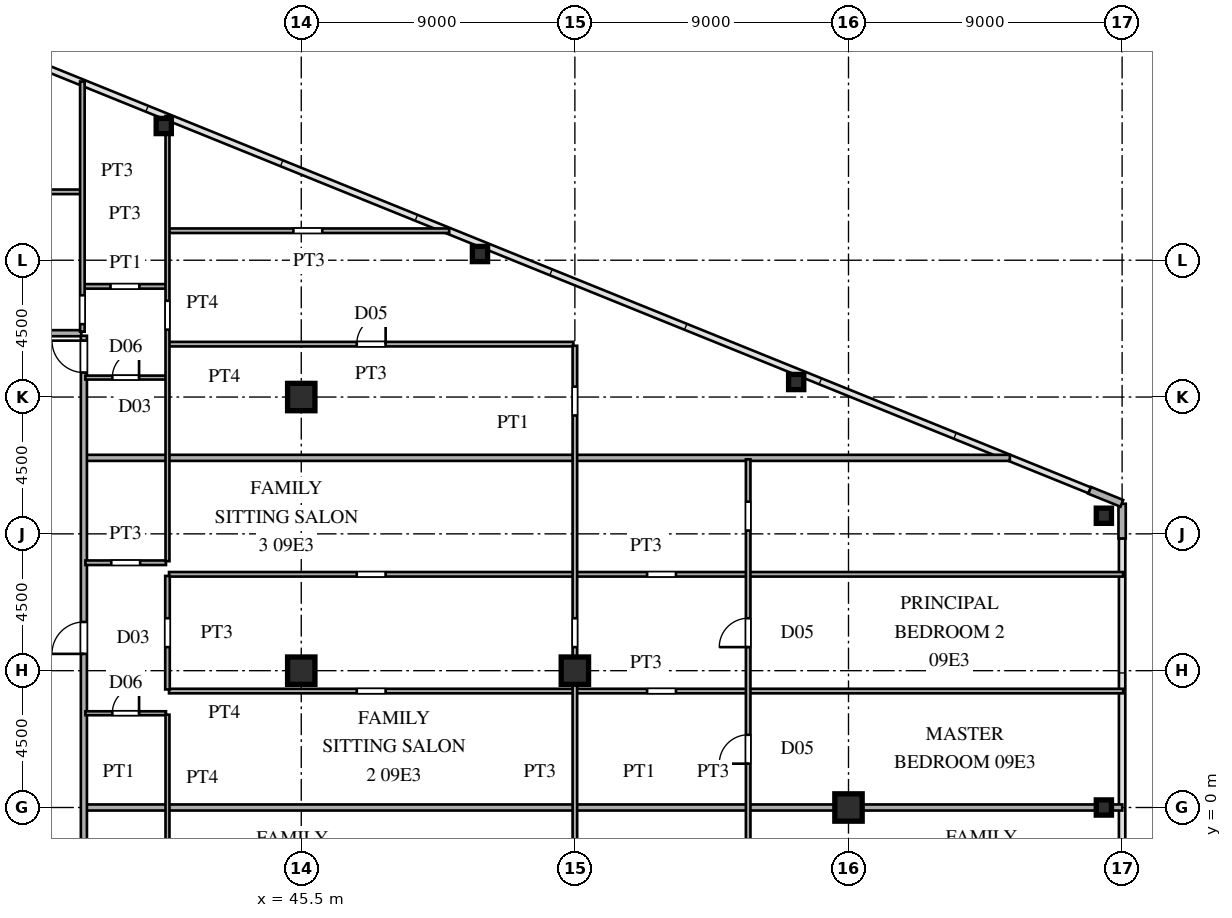
"""IFC4 building model, lengths in metres.
Left out: names, types, materials, properties, quantities, classifications, styles, units other than length and angle.
Written with IfcOpenShell. Run it as: python <this file> out.ifc"""

import sys

from ifc_helpers import new_model, si_unit, direction, frame, frame_2d, origin, origin_2d, place, context, subcontext, project, spatial, rectangle, hollow_rectangle, i_section, extrude, source, transform, mapped, element, fill, save


model = new_model("IFC4")
c1 = context("Model", 3, precision=1e-05, world=origin(), true_north=direction((0.0, 1.0)))
c2 = subcontext(c1, "Body", "Model", "MODEL_VIEW")
j1 = project(units=[si_unit("LENGTHUNIT", "METRE"), si_unit("PLANEANGLEUNIT", "RADIAN")], contexts=[c1])
p1 = place(None, origin())
s1 = spatial("IfcSite", under=j1, at=p1, CompositionType="ELEMENT")
p2 = place(p1, origin())
s2 = spatial("IfcBuilding", under=s1, at=p2, CompositionType="ELEMENT")
p3 = place(p2, frame((0.0, 0.0, 36.9)))
s3 = spatial("IfcBuildingStorey", under=s2, at=p3, CompositionType="ELEMENT", Elevation=36.9)
m1 = source(origin(), c2, "Body", "SweptSolid", [
    extrude(i_section(OverallWidth=0.9, OverallDepth=0.9, WebThickness=0.036, FlangeThickness=0.055, at=origin_2d()), origin(), (0.0, 0.0, 1.0), 3.6),
])
for number, where, z_axis, x_axis in (
    (1, (45.5, 4.5, 0.0), (0.0, 0.0, 1.0), (1.0, 0.0, 0.0)),
    (2, (45.5, 13.5, 0.0), (0.0, 0.0, 1.0), (1.0, 0.0, 0.0)),
    (3, (54.5, 4.5, 0.0), (0.0, 0.0, 1.0), (1.0, 0.0, 0.0)),
    (4, (63.5, 0.0, 0.0), (0.0, 0.0, 1.0), (1.0, 0.0, 0.0)),
):
    element("IfcColumn", number, at=place(p3, frame(where, z_axis=z_axis, x_axis=x_axis)), inside=s3, PredefinedType="COLUMN", context=c2, shape_type="MappedRepresentation", body=[
        mapped(m1, transform((0.0, 0.0, 0.0), scale=1.0)),
    ])
m2 = source(origin(), c2, "Body", "SweptSolid", [
    extrude(hollow_rectangle(XDim=0.5, YDim=0.5, WallThickness=0.02, at=origin_2d()), origin(), (0.0, 0.0, 1.0), 3.6),
])
for number, where, z_axis, x_axis in (
    (5, (71.9, 9.596, 0.0), (0.0, 0.0, 1.0), (1.0, 0.0, 0.0)),
    (6, (40.977, 22.414, 0.0), (0.0, 0.0, 1.0), (1.0, 0.0, 0.0)),
    (7, (51.378, 18.204, 0.0), (0.0, 0.0, 1.0), (1.0, 0.0, 0.0)),
    (8, (61.779, 13.994, 0.0), (0.0, 0.0, 1.0), (1.0, 0.0, 0.0)),
    (9, (71.9, 0.0, 0.0), (0.0, 0.0, 1.0), (1.0, 0.0, 0.0)),
):
    element("IfcColumn", number, at=place(p3, frame(where, z_axis=z_axis, x_axis=x_axis)), inside=s3, PredefinedType="COLUMN", context=c2, shape_type="MappedRepresentation", body=[
        mapped(m2, transform((0.0, 0.0, 0.0), scale=1.0)),
    ])
for number, where, z_axis, x_axis in (
    (10, (72.5, 8.85, 0.0), (0.0, 0.0, 1.0), (0.0, 1.0, 0.0)),
    (11, (72.491, 10.004, 0.0), (0.0, 0.0, 1.0), (-0.927, 0.375, 0.0)),
):
    element("IfcWall", number, at=place(p3, frame(where, z_axis=z_axis, x_axis=x_axis)), inside=s3, PredefinedType="SOLIDWALL", context=c2, shape_type="SweptSolid", body=[
        extrude(rectangle(XDim=1.14, YDim=0.24, at=frame_2d((0.57, 0.0))), origin(), (0.0, 0.0, 1.0), 3.38),
    ])
p4 = place(p3, frame((38.43, 0.0, 0.0), z_axis=(0.0, 0.0, 1.0), x_axis=(1.0, 0.0, 0.0)))
e12 = element("IfcWall", 12, at=p4, inside=s3, PredefinedType="PARTITIONING", context=c2, shape_type="SweptSolid", body=[
    extrude(rectangle(XDim=25.05, YDim=0.2, at=frame_2d((12.525, 0.0))), origin(), (0.0, 0.0, 1.0), 3.38),
])
p5 = place(p3, frame((63.48, 0.0, 0.0), z_axis=(0.0, 0.0, 1.0), x_axis=(1.0, 0.0, 0.0)))
e13 = element("IfcWall", 13, at=p5, inside=s3, PredefinedType="PARTITIONING", context=c2, shape_type="SweptSolid", body=[
    extrude(rectangle(XDim=9.025, YDim=0.2, at=frame_2d((4.512, 0.0))), origin(), (0.0, 0.0, 1.0), 2.68),
])
p6 = place(p3, frame((38.4, 3.1, 0.0), z_axis=(0.0, 0.0, 1.0), x_axis=(1.0, 0.0, 0.0)))
e14 = element("IfcWall", 14, at=p6, inside=s3, PredefinedType="PARTITIONING", context=c2, shape_type="SweptSolid", body=[
    extrude(rectangle(XDim=2.65, YDim=0.13, at=frame_2d((1.325, 0.0))), origin(), (0.0, 0.0, 1.0), 3.38),
])
p7 = place(p6, frame((0.885, 0.0, 0.0)))
e15 = element("IfcOpeningElement", 15, at=p7, cuts=e14, PredefinedType="OPENING", context=c2, shape_type="SweptSolid", body=[
    extrude(rectangle(XDim=0.88, YDim=2.1, at=frame_2d((0.44, 1.05))), frame((0.0, 0.075, 0.0), z_axis=(0.0, -1.0, 0.0), x_axis=(1.0, 0.0, 0.0)), (0.0, 0.0, 1.0), 0.15),
])
p8 = place(p3, frame((41.15, 3.83, 0.0), z_axis=(0.0, 0.0, 1.0), x_axis=(1.0, 0.0, 0.0)))
e16 = element("IfcWall", 16, at=p8, inside=s3, PredefinedType="PARTITIONING", context=c2, shape_type="SweptSolid", body=[
    extrude(rectangle(XDim=31.385, YDim=0.15, at=frame_2d((15.692, 0.0))), origin(), (0.0, 0.0, 1.0), 3.38),
])
p9 = place(p8, frame((6.175, 0.0, 0.0)))
e17 = element("IfcOpeningElement", 17, at=p9, cuts=e16, PredefinedType="OPENING", context=c2, shape_type="SweptSolid", body=[
    extrude(rectangle(XDim=0.95, YDim=2.15, at=frame_2d((0.475, 1.075))), frame((0.0, 0.085, 0.0), z_axis=(0.0, -1.0, 0.0), x_axis=(1.0, 0.0, 0.0)), (0.0, 0.0, 1.0), 0.17),
])
p10 = place(p8, frame((15.725, 0.0, 0.0)))
e18 = element("IfcOpeningElement", 18, at=p10, cuts=e16, PredefinedType="OPENING", context=c2, shape_type="SweptSolid", body=[
    extrude(rectangle(XDim=0.95, YDim=2.15, at=frame_2d((0.475, 1.075))), frame((0.0, 0.085, 0.0), z_axis=(0.0, -1.0, 0.0), x_axis=(1.0, 0.0, 0.0)), (0.0, 0.0, 1.0), 0.17),
])
p11 = place(p3, frame((41.15, 7.67, 0.0), z_axis=(0.0, 0.0, 1.0), x_axis=(1.0, 0.0, 0.0)))
e19 = element("IfcWall", 19, at=p11, inside=s3, PredefinedType="PARTITIONING", context=c2, shape_type="SweptSolid", body=[
    extrude(rectangle(XDim=31.385, YDim=0.15, at=frame_2d((15.692, 0.0))), origin(), (0.0, 0.0, 1.0), 3.38),
])
p12 = place(p11, frame((6.175, 0.0, 0.0)))
e20 = element("IfcOpeningElement", 20, at=p12, cuts=e19, PredefinedType="OPENING", context=c2, shape_type="SweptSolid", body=[
    extrude(rectangle(XDim=0.95, YDim=2.15, at=frame_2d((0.475, 1.075))), frame((0.0, 0.085, 0.0), z_axis=(0.0, -1.0, 0.0), x_axis=(1.0, 0.0, 0.0)), (0.0, 0.0, 1.0), 0.17),
])
p13 = place(p11, frame((15.725, 0.0, 0.0)))
e21 = element("IfcOpeningElement", 21, at=p13, cuts=e19, PredefinedType="OPENING", context=c2, shape_type="SweptSolid", body=[
    extrude(rectangle(XDim=0.95, YDim=2.15, at=frame_2d((0.475, 1.075))), frame((0.0, 0.085, 0.0), z_axis=(0.0, -1.0, 0.0), x_axis=(1.0, 0.0, 0.0)), (0.0, 0.0, 1.0), 0.17),
])
p14 = place(p3, frame((38.4, 8.05, 0.0), z_axis=(0.0, 0.0, 1.0), x_axis=(1.0, 0.0, 0.0)))
e22 = element("IfcWall", 22, at=p14, inside=s3, PredefinedType="PARTITIONING", context=c2, shape_type="SweptSolid", body=[
    extrude(rectangle(XDim=2.65, YDim=0.15, at=frame_2d((1.325, 0.0))), origin(), (0.0, 0.0, 1.0), 3.38),
])
p15 = place(p14, frame((0.85, 0.0, 0.0)))
e23 = element("IfcOpeningElement", 23, at=p15, cuts=e22, PredefinedType="OPENING", context=c2, shape_type="SweptSolid", body=[
    extrude(rectangle(XDim=0.95, YDim=2.15, at=frame_2d((0.475, 1.075))), frame((0.0, 0.085, 0.0), z_axis=(0.0, -1.0, 0.0), x_axis=(1.0, 0.0, 0.0)), (0.0, 0.0, 1.0), 0.17),
])
p16 = place(p3, frame((38.43, 11.5, 0.0), z_axis=(0.0, 0.0, 1.0), x_axis=(1.0, 0.0, 0.0)))
e24 = element("IfcWall", 24, at=p16, inside=s3, PredefinedType="PARTITIONING", context=c2, shape_type="SweptSolid", body=[
    extrude(rectangle(XDim=30.377, YDim=0.2, at=frame_2d((15.188, 0.0))), origin(), (0.0, 0.0, 1.0), 3.38),
])
p17 = place(p3, frame((38.4, 14.14, 0.0), z_axis=(0.0, 0.0, 1.0), x_axis=(1.0, 0.0, 0.0)))
e25 = element("IfcWall", 25, at=p17, inside=s3, PredefinedType="PARTITIONING", context=c2, shape_type="SweptSolid", body=[
    extrude(rectangle(XDim=2.65, YDim=0.13, at=frame_2d((1.325, 0.0))), origin(), (0.0, 0.0, 1.0), 3.38),
])
p18 = place(p17, frame((0.885, 0.0, 0.0)))
e26 = element("IfcOpeningElement", 26, at=p18, cuts=e25, PredefinedType="OPENING", context=c2, shape_type="SweptSolid", body=[
    extrude(rectangle(XDim=0.88, YDim=2.1, at=frame_2d((0.44, 1.05))), frame((0.0, 0.075, 0.0), z_axis=(0.0, -1.0, 0.0), x_axis=(1.0, 0.0, 0.0)), (0.0, 0.0, 1.0), 0.15),
])
p19 = place(p3, frame((41.15, 15.24, 0.0), z_axis=(0.0, 0.0, 1.0), x_axis=(1.0, 0.0, 0.0)))
e27 = element("IfcWall", 27, at=p19, inside=s3, PredefinedType="PARTITIONING", context=c2, shape_type="SweptSolid", body=[
    extrude(rectangle(XDim=13.3, YDim=0.15, at=frame_2d((6.65, 0.0))), origin(), (0.0, 0.0, 1.0), 3.38),
])
p20 = place(p19, frame((6.175, 0.0, 0.0)))
e28 = element("IfcOpeningElement", 28, at=p20, cuts=e27, PredefinedType="OPENING", context=c2, shape_type="SweptSolid", body=[
    extrude(rectangle(XDim=0.95, YDim=2.15, at=frame_2d((0.475, 1.075))), frame((0.0, 0.085, 0.0), z_axis=(0.0, -1.0, 0.0), x_axis=(1.0, 0.0, 0.0)), (0.0, 0.0, 1.0), 0.17),
])
p21 = place(p3, frame((36.585, 15.6, 0.0), z_axis=(0.0, 0.0, 1.0), x_axis=(1.0, 0.0, 0.0)))
e29 = element("IfcWall", 29, at=p21, inside=s3, PredefinedType="PARTITIONING", context=c2, shape_type="SweptSolid", body=[
    extrude(rectangle(XDim=1.68, YDim=0.2, at=frame_2d((0.84, 0.0))), origin(), (0.0, 0.0, 1.0), 3.38),
])
p22 = place(p3, frame((38.35, 17.14, 0.0), z_axis=(0.0, 0.0, 1.0), x_axis=(1.0, 0.0, 0.0)))
e30 = element("IfcWall", 30, at=p22, inside=s3, PredefinedType="PARTITIONING", context=c2, shape_type="SweptSolid", body=[
    extrude(rectangle(XDim=2.7, YDim=0.15, at=frame_2d((1.35, 0.0))), origin(), (0.0, 0.0, 1.0), 3.38),
])
p23 = place(p22, frame((0.875, 0.0, 0.0)))
e31 = element("IfcOpeningElement", 31, at=p23, cuts=e30, PredefinedType="OPENING", context=c2, shape_type="SweptSolid", body=[
    extrude(rectangle(XDim=0.95, YDim=2.15, at=frame_2d((0.475, 1.075))), frame((0.0, 0.085, 0.0), z_axis=(0.0, -1.0, 0.0), x_axis=(1.0, 0.0, 0.0)), (0.0, 0.0, 1.0), 0.17),
])
p24 = place(p3, frame((41.15, 18.97, 0.0), z_axis=(0.0, 0.0, 1.0), x_axis=(1.0, 0.0, 0.0)))
e32 = element("IfcWall", 32, at=p24, inside=s3, PredefinedType="PARTITIONING", context=c2, shape_type="SweptSolid", body=[
    extrude(rectangle(XDim=9.216, YDim=0.15, at=frame_2d((4.608, 0.0))), origin(), (0.0, 0.0, 1.0), 3.38),
])
p25 = place(p24, frame((4.091, 0.0, 0.0)))
e33 = element("IfcOpeningElement", 33, at=p25, cuts=e32, PredefinedType="OPENING", context=c2, shape_type="SweptSolid", body=[
    extrude(rectangle(XDim=0.95, YDim=2.15, at=frame_2d((0.475, 1.075))), frame((0.0, 0.085, 0.0), z_axis=(0.0, -1.0, 0.0), x_axis=(1.0, 0.0, 0.0)), (0.0, 0.0, 1.0), 0.17),
])
p26 = place(p3, frame((27.465, 20.25, 0.0), z_axis=(0.0, 0.0, 1.0), x_axis=(1.0, 0.0, 0.0)))
e34 = element("IfcWall", 34, at=p26, inside=s3, PredefinedType="PARTITIONING", context=c2, shape_type="SweptSolid", body=[
    extrude(rectangle(XDim=10.785, YDim=0.15, at=frame_2d((5.393, 0.0))), origin(), (0.0, 0.0, 1.0), 3.38),
])
p27 = place(p26, frame((4.96, 0.0, 0.0)))
e35 = element("IfcOpeningElement", 35, at=p27, cuts=e34, PredefinedType="OPENING", context=c2, shape_type="SweptSolid", body=[
    extrude(rectangle(XDim=0.95, YDim=2.15, at=frame_2d((0.475, 1.075))), frame((0.0, 0.085, 0.0), z_axis=(0.0, -1.0, 0.0), x_axis=(1.0, 0.0, 0.0)), (0.0, 0.0, 1.0), 0.17),
])
p28 = place(p3, frame((38.3, 15.65, 0.0), z_axis=(0.0, 0.0, 1.0), x_axis=(0.0, 1.0, 0.0)))
e36 = element("IfcWall", 36, at=p28, inside=s3, PredefinedType="PARTITIONING", context=c2, shape_type="SweptSolid", body=[
    extrude(rectangle(XDim=8.228, YDim=0.15, at=frame_2d((4.114, 0.0))), origin(), (0.0, 0.0, 1.0), 3.38),
])
p29 = place(p28, frame((0.248, 0.0, 0.0)))
e37 = element("IfcOpeningElement", 37, at=p29, cuts=e36, PredefinedType="OPENING", context=c2, shape_type="SweptSolid", body=[
    extrude(rectangle(XDim=0.95, YDim=2.15, at=frame_2d((0.475, 1.075))), frame((0.0, 0.085, 0.0), z_axis=(0.0, -1.0, 0.0), x_axis=(1.0, 0.0, 0.0)), (0.0, 0.0, 1.0), 0.17),
])
p30 = place(p3, frame((38.35, -15.515, 0.0), z_axis=(0.0, 0.0, 1.0), x_axis=(0.0, 1.0, 0.0)))
e38 = element("IfcWall", 38, at=p30, inside=s3, PredefinedType="PARTITIONING", context=c2, shape_type="SweptSolid", body=[
    extrude(rectangle(XDim=31.03, YDim=0.2, at=frame_2d((15.515, 0.0))), origin(), (0.0, 0.0, 1.0), 3.38),
])
p31 = place(p30, frame((0.16, 0.0, 0.0)))
e39 = element("IfcOpeningElement", 39, at=p31, cuts=e38, PredefinedType="OPENING", context=c2, shape_type="SweptSolid", body=[
    extrude(rectangle(XDim=1.05, YDim=2.25, at=frame_2d((0.525, 1.125))), frame((0.0, 0.11, 0.0), z_axis=(0.0, -1.0, 0.0), x_axis=(1.0, 0.0, 0.0)), (0.0, 0.0, 1.0), 0.22),
])
p32 = place(p30, frame((9.067, 0.0, 0.0)))
e40 = element("IfcOpeningElement", 40, at=p32, cuts=e38, PredefinedType="OPENING", context=c2, shape_type="SweptSolid", body=[
    extrude(rectangle(XDim=1.05, YDim=2.25, at=frame_2d((0.525, 1.125))), frame((0.0, 0.11, 0.0), z_axis=(0.0, -1.0, 0.0), x_axis=(1.0, 0.0, 0.0)), (0.0, 0.0, 1.0), 0.22),
])
p33 = place(p30, frame((20.567, 0.0, 0.0)))
e41 = element("IfcOpeningElement", 41, at=p33, cuts=e38, PredefinedType="OPENING", context=c2, shape_type="SweptSolid", body=[
    extrude(rectangle(XDim=1.05, YDim=2.25, at=frame_2d((0.525, 1.125))), frame((0.0, 0.11, 0.0), z_axis=(0.0, -1.0, 0.0), x_axis=(1.0, 0.0, 0.0)), (0.0, 0.0, 1.0), 0.22),
])
p34 = place(p30, frame((29.82, 0.0, 0.0)))
e42 = element("IfcOpeningElement", 42, at=p34, cuts=e38, PredefinedType="OPENING", context=c2, shape_type="SweptSolid", body=[
    extrude(rectangle(XDim=1.05, YDim=2.25, at=frame_2d((0.525, 1.125))), frame((0.0, 0.11, 0.0), z_axis=(0.0, -1.0, 0.0), x_axis=(1.0, 0.0, 0.0)), (0.0, 0.0, 1.0), 0.22),
])
p35 = place(p3, frame((41.1, -3.398, 0.0), z_axis=(0.0, 0.0, 1.0), x_axis=(0.0, 1.0, 0.0)))
e43 = element("IfcWall", 43, at=p35, inside=s3, PredefinedType="PARTITIONING", context=c2, shape_type="SweptSolid", body=[
    extrude(rectangle(XDim=6.451, YDim=0.13, at=frame_2d((3.226, 0.0))), origin(), (0.0, 0.0, 1.0), 3.38),
])
p36 = place(p3, frame((41.1, 3.883, 0.0), z_axis=(0.0, 0.0, 1.0), x_axis=(0.0, 1.0, 0.0)))
e44 = element("IfcWall", 44, at=p36, inside=s3, PredefinedType="PARTITIONING", context=c2, shape_type="SweptSolid", body=[
    extrude(rectangle(XDim=3.734, YDim=0.15, at=frame_2d((1.867, 0.0))), origin(), (0.0, 0.0, 1.0), 2.99),
])
p37 = place(p36, frame((1.392, 0.0, 0.0)))
e45 = element("IfcOpeningElement", 45, at=p37, cuts=e44, PredefinedType="OPENING", context=c2, shape_type="SweptSolid", body=[
    extrude(rectangle(XDim=0.95, YDim=2.15, at=frame_2d((0.475, 1.075))), frame((0.0, 0.085, 0.0), z_axis=(0.0, -1.0, 0.0), x_axis=(1.0, 0.0, 0.0)), (0.0, 0.0, 1.0), 0.17),
])
p38 = place(p3, frame((41.1, 8.102, 0.0), z_axis=(0.0, 0.0, 1.0), x_axis=(0.0, 1.0, 0.0)))
e46 = element("IfcWall", 46, at=p38, inside=s3, PredefinedType="PARTITIONING", context=c2, shape_type="SweptSolid", body=[
    extrude(rectangle(XDim=14.642, YDim=0.13, at=frame_2d((7.321, 0.0))), origin(), (0.0, 0.0, 1.0), 3.38),
])
p39 = place(p38, frame((7.614, 0.0, 0.0)))
e47 = element("IfcOpeningElement", 47, at=p39, cuts=e46, PredefinedType="OPENING", context=c2, shape_type="SweptSolid", body=[
    extrude(rectangle(XDim=0.95, YDim=2.15, at=frame_2d((0.475, 1.075))), frame((0.0, 0.075, 0.0), z_axis=(0.0, -1.0, 0.0), x_axis=(1.0, 0.0, 0.0)), (0.0, 0.0, 1.0), 0.15),
])
p40 = place(p3, frame((54.5, -15.186, 0.0), z_axis=(0.0, 0.0, 1.0), x_axis=(0.0, 1.0, 0.0)))
e48 = element("IfcWall", 48, at=p40, inside=s3, PredefinedType="PARTITIONING", context=c2, shape_type="SweptSolid", body=[
    extrude(rectangle(XDim=30.372, YDim=0.15, at=frame_2d((15.186, 0.0))), origin(), (0.0, 0.0, 1.0), 2.68),
])
p41 = place(p40, frame((1.343, 0.0, 0.0)))
e49 = element("IfcOpeningElement", 49, at=p41, cuts=e48, PredefinedType="OPENING", context=c2, shape_type="SweptSolid", body=[
    extrude(rectangle(XDim=0.95, YDim=2.15, at=frame_2d((0.475, 1.075))), frame((0.0, 0.085, 0.0), z_axis=(0.0, -1.0, 0.0), x_axis=(1.0, 0.0, 0.0)), (0.0, 0.0, 1.0), 0.17),
])
p42 = place(p40, frame((8.961, 0.0, 0.0)))
e50 = element("IfcOpeningElement", 50, at=p42, cuts=e48, PredefinedType="OPENING", context=c2, shape_type="SweptSolid", body=[
    extrude(rectangle(XDim=0.95, YDim=2.15, at=frame_2d((0.475, 1.075))), frame((0.0, 0.085, 0.0), z_axis=(0.0, -1.0, 0.0), x_axis=(1.0, 0.0, 0.0)), (0.0, 0.0, 1.0), 0.17),
])
p43 = place(p40, frame((20.461, 0.0, 0.0)))
e51 = element("IfcOpeningElement", 51, at=p43, cuts=e48, PredefinedType="OPENING", context=c2, shape_type="SweptSolid", body=[
    extrude(rectangle(XDim=0.95, YDim=2.15, at=frame_2d((0.475, 1.075))), frame((0.0, 0.085, 0.0), z_axis=(0.0, -1.0, 0.0), x_axis=(1.0, 0.0, 0.0)), (0.0, 0.0, 1.0), 0.17),
])
p44 = place(p40, frame((28.079, 0.0, 0.0)))
e52 = element("IfcOpeningElement", 52, at=p44, cuts=e48, PredefinedType="OPENING", context=c2, shape_type="SweptSolid", body=[
    extrude(rectangle(XDim=0.95, YDim=2.15, at=frame_2d((0.475, 1.075))), frame((0.0, 0.085, 0.0), z_axis=(0.0, -1.0, 0.0), x_axis=(1.0, 0.0, 0.0)), (0.0, 0.0, 1.0), 0.17),
])
p45 = place(p3, frame((60.2, -11.45, 0.0), z_axis=(0.0, 0.0, 1.0), x_axis=(0.0, 1.0, 0.0)))
e53 = element("IfcWall", 53, at=p45, inside=s3, PredefinedType="PARTITIONING", context=c2, shape_type="SweptSolid", body=[
    extrude(rectangle(XDim=22.9, YDim=0.15, at=frame_2d((11.45, 0.0))), origin(), (0.0, 0.0, 1.0), 3.38),
])
p46 = place(p45, frame((1.392, 0.0, 0.0)))
e54 = element("IfcOpeningElement", 54, at=p46, cuts=e53, PredefinedType="OPENING", context=c2, shape_type="SweptSolid", body=[
    extrude(rectangle(XDim=0.95, YDim=2.15, at=frame_2d((0.475, 1.075))), frame((0.0, 0.085, 0.0), z_axis=(0.0, -1.0, 0.0), x_axis=(1.0, 0.0, 0.0)), (0.0, 0.0, 1.0), 0.17),
])
p47 = place(p45, frame((5.225, 0.0, 0.0)))
e55 = element("IfcOpeningElement", 55, at=p47, cuts=e53, PredefinedType="OPENING", context=c2, shape_type="SweptSolid", body=[
    extrude(rectangle(XDim=0.95, YDim=2.15, at=frame_2d((0.475, 1.075))), frame((0.0, 0.085, 0.0), z_axis=(0.0, -1.0, 0.0), x_axis=(1.0, 0.0, 0.0)), (0.0, 0.0, 1.0), 0.17),
])
p48 = place(p45, frame((9.058, 0.0, 0.0)))
e56 = element("IfcOpeningElement", 56, at=p48, cuts=e53, PredefinedType="OPENING", context=c2, shape_type="SweptSolid", body=[
    extrude(rectangle(XDim=0.95, YDim=2.15, at=frame_2d((0.475, 1.075))), frame((0.0, 0.085, 0.0), z_axis=(0.0, -1.0, 0.0), x_axis=(1.0, 0.0, 0.0)), (0.0, 0.0, 1.0), 0.17),
])
p49 = place(p45, frame((12.892, 0.0, 0.0)))
e57 = element("IfcOpeningElement", 57, at=p49, cuts=e53, PredefinedType="OPENING", context=c2, shape_type="SweptSolid", body=[
    extrude(rectangle(XDim=0.95, YDim=2.15, at=frame_2d((0.475, 1.075))), frame((0.0, 0.085, 0.0), z_axis=(0.0, -1.0, 0.0), x_axis=(1.0, 0.0, 0.0)), (0.0, 0.0, 1.0), 0.17),
])
p50 = place(p45, frame((16.725, 0.0, 0.0)))
e58 = element("IfcOpeningElement", 58, at=p50, cuts=e53, PredefinedType="OPENING", context=c2, shape_type="SweptSolid", body=[
    extrude(rectangle(XDim=0.95, YDim=2.15, at=frame_2d((0.475, 1.075))), frame((0.0, 0.085, 0.0), z_axis=(0.0, -1.0, 0.0), x_axis=(1.0, 0.0, 0.0)), (0.0, 0.0, 1.0), 0.17),
])
p51 = place(p45, frame((20.558, 0.0, 0.0)))
e59 = element("IfcOpeningElement", 59, at=p51, cuts=e53, PredefinedType="OPENING", context=c2, shape_type="SweptSolid", body=[
    extrude(rectangle(XDim=0.95, YDim=2.15, at=frame_2d((0.475, 1.075))), frame((0.0, 0.085, 0.0), z_axis=(0.0, -1.0, 0.0), x_axis=(1.0, 0.0, 0.0)), (0.0, 0.0, 1.0), 0.17),
])
m3 = source(origin(), c2, "Body", "SweptSolid", [
    extrude(rectangle(XDim=0.88, YDim=2.1, at=frame_2d((0.44, 1.05))), frame((0.0, 0.025, 0.0), z_axis=(0.0, -1.0, 0.0), x_axis=(1.0, 0.0, 0.0)), (0.0, 0.0, 1.0), 0.05),
])
p52 = place(p7, origin())
e60 = element("IfcDoor", 60, at=p52, inside=s3, OperationType="SINGLE_SWING_RIGHT", PredefinedType="DOOR", context=c2, shape_type="MappedRepresentation", body=[
    mapped(m3, transform((0.0, 0.0, 0.0), scale=1.0)),
])
fill(e15, e60)
p53 = place(p18, origin())
e61 = element("IfcDoor", 61, at=p53, inside=s3, OperationType="SINGLE_SWING_RIGHT", PredefinedType="DOOR", context=c2, shape_type="MappedRepresentation", body=[
    mapped(m3, transform((0.0, 0.0, 0.0), scale=1.0)),
])
fill(e26, e61)
m4 = source(origin(), c2, "Body", "SweptSolid", [
    extrude(rectangle(XDim=0.95, YDim=2.15, at=frame_2d((0.475, 1.075))), frame((0.0, 0.025, 0.0), z_axis=(0.0, -1.0, 0.0), x_axis=(1.0, 0.0, 0.0)), (0.0, 0.0, 1.0), 0.05),
])
p54 = place(p20, origin())
e62 = element("IfcDoor", 62, at=p54, inside=s3, OperationType="SINGLE_SWING_RIGHT", PredefinedType="DOOR", context=c2, shape_type="MappedRepresentation", body=[
    mapped(m4, transform((0.0, 0.0, 0.0), scale=1.0)),
])
fill(e28, e62)
m5 = source(origin(), c2, "Body", "SweptSolid", [
    extrude(rectangle(XDim=1.05, YDim=2.25, at=frame_2d((0.525, 1.125))), frame((0.0, 0.025, 0.0), z_axis=(0.0, -1.0, 0.0), x_axis=(1.0, 0.0, 0.0)), (0.0, 0.0, 1.0), 0.05),
])
p55 = place(p33, origin())
e63 = element("IfcDoor", 63, at=p55, inside=s3, OperationType="SINGLE_SWING_LEFT", PredefinedType="DOOR", context=c2, shape_type="MappedRepresentation", body=[
    mapped(m5, transform((0.0, 0.0, 0.0), scale=1.0)),
])
fill(e41, e63)
p56 = place(p34, origin())
e64 = element("IfcDoor", 64, at=p56, inside=s3, OperationType="SINGLE_SWING_RIGHT", PredefinedType="DOOR", context=c2, shape_type="MappedRepresentation", body=[
    mapped(m5, transform((0.0, 0.0, 0.0), scale=1.0)),
])
fill(e42, e64)
p57 = place(p49, origin())
e65 = element("IfcDoor", 65, at=p57, inside=s3, OperationType="SINGLE_SWING_LEFT", PredefinedType="DOOR", context=c2, shape_type="MappedRepresentation", body=[
    mapped(m4, transform((0.0, 0.0, 0.0), scale=1.0)),
])
fill(e57, e65)
p58 = place(p50, origin())
e66 = element("IfcDoor", 66, at=p58, inside=s3, OperationType="SINGLE_SWING_LEFT", PredefinedType="DOOR", context=c2, shape_type="MappedRepresentation", body=[
    mapped(m4, transform((0.0, 0.0, 0.0), scale=1.0)),
])
fill(e58, e66)
save(model, sys.argv[1])
